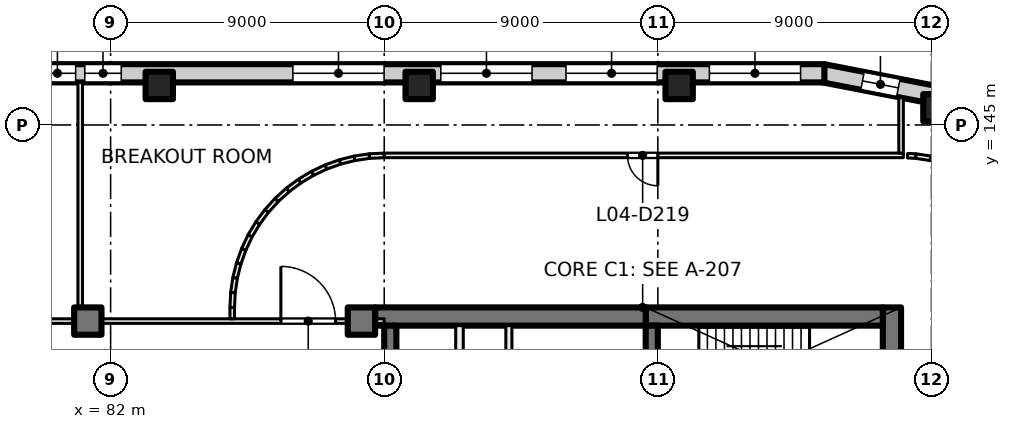
"""IFC4 building model, lengths in metres.
Left out: names, types, materials, properties, quantities, classifications, styles, units other than length and angle.
Written with IfcOpenShell. Run it as: python <this file> out.ifc"""

import sys

from ifc_helpers import new_model, si_unit, direction, frame, frame_2d, origin, origin_2d, place, context, subcontext, project, spatial, rectangle, extrude, element, fill, save


model = new_model("IFC4")
c1 = context("Model", 3, precision=1e-05, world=origin(), true_north=direction((0.0, 1.0)))
c2 = subcontext(c1, "Body", "Model", "MODEL_VIEW")
j1 = project(units=[si_unit("LENGTHUNIT", "METRE"), si_unit("PLANEANGLEUNIT", "RADIAN")], contexts=[c1])
p1 = place(None, origin())
s1 = spatial("IfcSite", under=j1, at=p1, CompositionType="ELEMENT")
p2 = place(p1, origin())
s2 = spatial("IfcBuilding", under=s1, at=p2, CompositionType="ELEMENT")
p3 = place(p2, frame((0.0, 0.0, 22.5)))
s3 = spatial("IfcBuildingStorey", under=s2, at=p3, CompositionType="ELEMENT", Elevation=22.5)
for number, where, z_axis, x_axis in (
    (1, (83.6, 146.3, 0.0), (0.0, 0.0, 1.0), (1.0, 0.0, 0.0)),
    (2, (92.15, 146.3, 0.0), (0.0, 0.0, 1.0), (1.0, 0.0, 0.0)),
    (3, (100.7, 146.3, 0.0), (0.0, 0.0, 1.0), (1.0, 0.0, 0.0)),
    (4, (109.18, 145.567, 0.0), (0.0, 0.0, 1.0), (1.0, 0.0, 0.0)),
    (5, (81.25, 138.55, 0.0), (0.0, 0.0, 1.0), (1.0, 0.0, 0.0)),
    (6, (90.25, 138.55, 0.0), (0.0, 0.0, 1.0), (1.0, 0.0, 0.0)),
):
    element("IfcColumn", number, at=place(p3, frame(where, z_axis=z_axis, x_axis=x_axis)), inside=s3, PredefinedType="COLUMN", context=c2, shape_type="SweptSolid", body=[
        extrude(rectangle(XDim=0.9, YDim=0.9, at=origin_2d()), origin(), (0.0, 0.0, 1.0), 5.0),
    ])
p4 = place(p3, frame((107.7, 139.0, 0.0), z_axis=(0.0, 0.0, 1.0), x_axis=(0.0, -1.0, 0.0)))
e7 = element("IfcWall", 7, at=p4, inside=s3, PredefinedType="SHEAR", context=c2, shape_type="SweptSolid", body=[
    extrude(rectangle(XDim=3.8, YDim=0.6, at=frame_2d((1.9, 0.0))), origin(), (0.0, 0.0, 1.0), 5.0),
])
p5 = place(p3, frame((107.4, 138.7, 0.0), z_axis=(0.0, 0.0, 1.0), x_axis=(-1.0, 0.0, 0.0)))
e8 = element("IfcWall", 8, at=p5, inside=s3, PredefinedType="SHEAR", context=c2, shape_type="SweptSolid", body=[
    extrude(rectangle(XDim=7.8, YDim=0.6, at=frame_2d((3.9, 0.0))), origin(), (0.0, 0.0, 1.0), 5.0),
])
p6 = place(p3, frame((99.6, 138.7, 0.0), z_axis=(0.0, 0.0, 1.0), x_axis=(-1.0, 0.0, 0.0)))
e9 = element("IfcWall", 9, at=p6, inside=s3, PredefinedType="SHEAR", context=c2, shape_type="SweptSolid", body=[
    extrude(rectangle(XDim=8.9, YDim=0.6, at=frame_2d((4.45, 0.0))), origin(), (0.0, 0.0, 1.0), 5.0),
])
p7 = place(p3, frame((99.8, 138.4, 0.0), z_axis=(0.0, 0.0, 1.0), x_axis=(0.0, -1.0, 0.0)))
e10 = element("IfcWall", 10, at=p7, inside=s3, PredefinedType="SHEAR", context=c2, shape_type="SweptSolid", body=[
    extrude(rectangle(XDim=2.8, YDim=0.4, at=frame_2d((1.4, 0.0))), origin(), (0.0, 0.0, 1.0), 5.0),
])
p8 = place(p7, frame((0.9, 0.0, 0.0)))
e11 = element("IfcOpeningElement", 11, at=p8, cuts=e10, PredefinedType="OPENING", context=c2, shape_type="SweptSolid", body=[
    extrude(rectangle(XDim=1.0, YDim=2.1, at=frame_2d((0.5, 1.05))), frame((0.0, 0.21, 0.0), z_axis=(0.0, -1.0, 0.0), x_axis=(1.0, 0.0, 0.0)), (0.0, 0.0, 1.0), 0.42),
])
p9 = place(p3, frame((91.2, 138.4, 0.0), z_axis=(0.0, 0.0, 1.0), x_axis=(0.0, -1.0, 0.0)))
e12 = element("IfcWall", 12, at=p9, inside=s3, PredefinedType="SHEAR", context=c2, shape_type="SweptSolid", body=[
    extrude(rectangle(XDim=8.6, YDim=0.4, at=frame_2d((4.3, 0.0))), origin(), (0.0, 0.0, 1.0), 5.0),
])
p10 = place(p3, frame((105.44, 146.702, 0.0), z_axis=(0.0, 0.0, 1.0), x_axis=(0.981593603981, -0.190981665674, 0.0)))
e13 = element("IfcWall", 13, at=p10, inside=s3, PredefinedType="SOLIDWALL", context=c2, shape_type="SweptSolid", body=[
    extrude(rectangle(XDim=4.025, YDim=0.6, at=frame_2d((2.013, 0.0))), origin(), (0.0, 0.0, 1.0), 4.625),
])
p11 = place(p10, frame((1.316, 0.0, 0.9)))
e14 = element("IfcOpeningElement", 14, at=p11, cuts=e13, PredefinedType="OPENING", context=c2, shape_type="SweptSolid", body=[
    extrude(rectangle(XDim=1.2, YDim=3.0, at=frame_2d((0.6, 1.5))), frame((0.0, 0.31, 0.0), z_axis=(0.0, -1.0, 0.0), x_axis=(1.0, 0.0, 0.0)), (0.0, 0.0, 1.0), 0.62),
])
p12 = place(p3, frame((46.114, 146.7, 0.0), z_axis=(0.0, 0.0, 1.0), x_axis=(1.0, 0.0, 0.0)))
e15 = element("IfcWall", 15, at=p12, inside=s3, PredefinedType="SOLIDWALL", context=c2, shape_type="SweptSolid", body=[
    extrude(rectangle(XDim=59.364, YDim=0.6, at=frame_2d((29.682, 0.0))), origin(), (0.0, 0.0, 1.0), 4.625),
])
p13 = place(p12, frame((5.35, 0.0, 0.9)))
e16 = element("IfcOpeningElement", 16, at=p13, cuts=e15, PredefinedType="OPENING", context=c2, shape_type="SweptSolid", body=[
    extrude(rectangle(XDim=3.0, YDim=3.0, at=frame_2d((1.5, 1.5))), frame((0.0, 0.31, 0.0), z_axis=(0.0, -1.0, 0.0), x_axis=(1.0, 0.0, 0.0)), (0.0, 0.0, 1.0), 0.62),
])
p14 = place(p12, frame((14.483, 0.0, 0.9)))
e17 = element("IfcOpeningElement", 17, at=p14, cuts=e15, PredefinedType="OPENING", context=c2, shape_type="SweptSolid", body=[
    extrude(rectangle(XDim=3.0, YDim=3.0, at=frame_2d((1.5, 1.5))), frame((0.0, 0.31, 0.0), z_axis=(0.0, -1.0, 0.0), x_axis=(1.0, 0.0, 0.0)), (0.0, 0.0, 1.0), 0.62),
])
p15 = place(p12, frame((23.615, 0.0, 0.9)))
e18 = element("IfcOpeningElement", 18, at=p15, cuts=e15, PredefinedType="OPENING", context=c2, shape_type="SweptSolid", body=[
    extrude(rectangle(XDim=3.0, YDim=3.0, at=frame_2d((1.5, 1.5))), frame((0.0, 0.31, 0.0), z_axis=(0.0, -1.0, 0.0), x_axis=(1.0, 0.0, 0.0)), (0.0, 0.0, 1.0), 0.62),
])
p16 = place(p12, frame((33.536, 0.0, 0.9)))
e19 = element("IfcOpeningElement", 19, at=p16, cuts=e15, PredefinedType="OPENING", context=c2, shape_type="SweptSolid", body=[
    extrude(rectangle(XDim=1.2, YDim=3.0, at=frame_2d((0.6, 1.5))), frame((0.0, 0.31, 0.0), z_axis=(0.0, -1.0, 0.0), x_axis=(1.0, 0.0, 0.0)), (0.0, 0.0, 1.0), 0.62),
])
p17 = place(p12, frame((35.036, 0.0, 0.9)))
e20 = element("IfcOpeningElement", 20, at=p17, cuts=e15, PredefinedType="OPENING", context=c2, shape_type="SweptSolid", body=[
    extrude(rectangle(XDim=1.2, YDim=3.0, at=frame_2d((0.6, 1.5))), frame((0.0, 0.31, 0.0), z_axis=(0.0, -1.0, 0.0), x_axis=(1.0, 0.0, 0.0)), (0.0, 0.0, 1.0), 0.62),
])
p18 = place(p12, frame((41.882, 0.0, 0.9)))
e21 = element("IfcOpeningElement", 21, at=p18, cuts=e15, PredefinedType="OPENING", context=c2, shape_type="SweptSolid", body=[
    extrude(rectangle(XDim=3.0, YDim=3.0, at=frame_2d((1.5, 1.5))), frame((0.0, 0.31, 0.0), z_axis=(0.0, -1.0, 0.0), x_axis=(1.0, 0.0, 0.0)), (0.0, 0.0, 1.0), 0.62),
])
p19 = place(p12, frame((46.748, 0.0, 0.9)))
e22 = element("IfcOpeningElement", 22, at=p19, cuts=e15, PredefinedType="OPENING", context=c2, shape_type="SweptSolid", body=[
    extrude(rectangle(XDim=3.0, YDim=3.0, at=frame_2d((1.5, 1.5))), frame((0.0, 0.31, 0.0), z_axis=(0.0, -1.0, 0.0), x_axis=(1.0, 0.0, 0.0)), (0.0, 0.0, 1.0), 0.62),
])
p20 = place(p12, frame((50.865, 0.0, 0.9)))
e23 = element("IfcOpeningElement", 23, at=p20, cuts=e15, PredefinedType="OPENING", context=c2, shape_type="SweptSolid", body=[
    extrude(rectangle(XDim=3.0, YDim=3.0, at=frame_2d((1.5, 1.5))), frame((0.0, 0.31, 0.0), z_axis=(0.0, -1.0, 0.0), x_axis=(1.0, 0.0, 0.0)), (0.0, 0.0, 1.0), 0.62),
])
p21 = place(p12, frame((55.581, 0.0, 0.9)))
e24 = element("IfcOpeningElement", 24, at=p21, cuts=e15, PredefinedType="OPENING", context=c2, shape_type="SweptSolid", body=[
    extrude(rectangle(XDim=3.0, YDim=3.0, at=frame_2d((1.5, 1.5))), frame((0.0, 0.31, 0.0), z_axis=(0.0, -1.0, 0.0), x_axis=(1.0, 0.0, 0.0)), (0.0, 0.0, 1.0), 0.62),
])
p22 = place(p3, frame((95.1, 130.0, 0.0), z_axis=(0.0, 0.0, 1.0), x_axis=(0.0, 1.0, 0.0)))
e25 = element("IfcWall", 25, at=p22, inside=s3, PredefinedType="PARTITIONING", context=c2, shape_type="SweptSolid", body=[
    extrude(rectangle(XDim=8.4, YDim=0.2, at=frame_2d((4.2, 0.0))), origin(), (0.0, 0.0, 1.0), 4.625),
])
p23 = place(p22, frame((5.25, 0.0, 0.0)))
e26 = element("IfcOpeningElement", 26, at=p23, cuts=e25, PredefinedType="OPENING", context=c2, shape_type="SweptSolid", body=[
    extrude(rectangle(XDim=1.5, YDim=2.1, at=frame_2d((0.75, 1.05))), frame((0.0, 0.11, 0.0), z_axis=(0.0, -1.0, 0.0), x_axis=(1.0, 0.0, 0.0)), (0.0, 0.0, 1.0), 0.22),
])
p24 = place(p3, frame((93.475, 130.0, 0.0), z_axis=(0.0, 0.0, 1.0), x_axis=(0.0, 1.0, 0.0)))
e27 = element("IfcWall", 27, at=p24, inside=s3, PredefinedType="PARTITIONING", context=c2, shape_type="SweptSolid", body=[
    extrude(rectangle(XDim=8.4, YDim=0.25, at=frame_2d((4.2, 0.0))), origin(), (0.0, 0.0, 1.0), 4.625),
])
p25 = place(p24, frame((3.7, 0.0, 0.0)))
e28 = element("IfcOpeningElement", 28, at=p25, cuts=e27, PredefinedType="OPENING", context=c2, shape_type="SweptSolid", body=[
    extrude(rectangle(XDim=1.0, YDim=2.1, at=frame_2d((0.5, 1.05))), frame((0.0, 0.135, 0.0), z_axis=(0.0, -1.0, 0.0), x_axis=(1.0, 0.0, 0.0)), (0.0, 0.0, 1.0), 0.27),
])
p26 = place(p3, frame((49.825, 138.55, 0.0), z_axis=(0.0, 0.0, 1.0), x_axis=(1.0, 0.0, 0.0)))
e29 = element("IfcWall", 29, at=p26, inside=s3, PredefinedType="PARTITIONING", context=c2, shape_type="SweptSolid", body=[
    extrude(rectangle(XDim=41.175, YDim=0.15, at=frame_2d((20.587, 0.0))), origin(), (0.0, 0.0, 1.0), 4.625),
])
p27 = place(p26, frame((37.775, 0.0, 0.0)))
e30 = element("IfcOpeningElement", 30, at=p27, cuts=e29, PredefinedType="OPENING", context=c2, shape_type="SweptSolid", body=[
    extrude(rectangle(XDim=1.8, YDim=2.1, at=frame_2d((0.9, 1.05))), frame((0.0, 0.085, 0.0), z_axis=(0.0, -1.0, 0.0), x_axis=(1.0, 0.0, 0.0)), (0.0, 0.0, 1.0), 0.17),
])
p28 = place(p3, frame((81.0, 138.625, 0.0), z_axis=(0.0, 0.0, 1.0), x_axis=(0.0, 1.0, 0.0)))
e31 = element("IfcWall", 31, at=p28, inside=s3, PredefinedType="PARTITIONING", context=c2, shape_type="SweptSolid", body=[
    extrude(rectangle(XDim=7.775, YDim=0.15, at=frame_2d((3.887, 0.0))), origin(), (0.0, 0.0, 1.0), 4.625),
])
p29 = place(p3, frame((86.0, 138.625, 0.0), z_axis=(0.0, 0.0, 1.0), x_axis=(0.0, 1.0, 0.0)))
e32 = element("IfcWall", 32, at=p29, inside=s3, PredefinedType="PARTITIONING", context=c2, shape_type="SweptSolid", body=[
    extrude(rectangle(XDim=0.377, YDim=0.15, at=frame_2d((0.188, 0.0))), origin(), (0.0, 0.0, 1.0), 4.625),
])
p30 = place(p3, frame((86.0, 138.998, 0.0), z_axis=(0.0, 0.0, 1.0), x_axis=(0.048196018647, 0.998837896651, 0.0)))
e33 = element("IfcWall", 33, at=p30, inside=s3, PredefinedType="PARTITIONING", context=c2, shape_type="SweptSolid", body=[
    extrude(rectangle(XDim=0.496, YDim=0.15, at=frame_2d((0.248, 0.0))), origin(), (0.0, 0.0, 1.0), 4.625),
])
p31 = place(p3, frame((86.023, 139.486, 0.0), z_axis=(0.0, 0.0, 1.0), x_axis=(0.148412307247, 0.988925572052, 0.0)))
e34 = element("IfcWall", 34, at=p31, inside=s3, PredefinedType="PARTITIONING", context=c2, shape_type="SweptSolid", body=[
    extrude(rectangle(XDim=0.499, YDim=0.15, at=frame_2d((0.249, 0.0))), origin(), (0.0, 0.0, 1.0), 4.625),
])
p32 = place(p3, frame((86.095, 139.971, 0.0), z_axis=(0.0, 0.0, 1.0), x_axis=(0.242650732785, 0.970113715952, 0.0)))
e35 = element("IfcWall", 35, at=p32, inside=s3, PredefinedType="PARTITIONING", context=c2, shape_type="SweptSolid", body=[
    extrude(rectangle(XDim=0.499, YDim=0.15, at=frame_2d((0.25, 0.0))), origin(), (0.0, 0.0, 1.0), 4.625),
])
for number, where, z_axis, x_axis in (
    (36, (86.214, 140.447, 0.0), (0.0, 0.0, 1.0), (0.337, 0.941, 0.0)),
    (37, (86.379, 140.91, 0.0), (0.0, 0.0, 1.0), (0.428, 0.904, 0.0)),
):
    element("IfcWall", number, at=place(p3, frame(where, z_axis=z_axis, x_axis=x_axis)), inside=s3, PredefinedType="PARTITIONING", context=c2, shape_type="SweptSolid", body=[
        extrude(rectangle(XDim=0.498, YDim=0.15, at=frame_2d((0.249, 0.0))), origin(), (0.0, 0.0, 1.0), 4.625),
    ])
p33 = place(p3, frame((86.588, 141.354, 0.0), z_axis=(0.0, 0.0, 1.0), x_axis=(0.515791778052, 0.85671397893, 0.0)))
e38 = element("IfcWall", 38, at=p33, inside=s3, PredefinedType="PARTITIONING", context=c2, shape_type="SweptSolid", body=[
    extrude(rectangle(XDim=0.499, YDim=0.15, at=frame_2d((0.249, 0.0))), origin(), (0.0, 0.0, 1.0), 4.625),
])
p34 = place(p3, frame((86.841, 141.775, 0.0), z_axis=(0.0, 0.0, 1.0), x_axis=(0.594570362092, 0.80404358372, 0.0)))
e39 = element("IfcWall", 39, at=p34, inside=s3, PredefinedType="PARTITIONING", context=c2, shape_type="SweptSolid", body=[
    extrude(rectangle(XDim=0.498, YDim=0.15, at=frame_2d((0.249, 0.0))), origin(), (0.0, 0.0, 1.0), 4.625),
])
for number, where, z_axis, x_axis in (
    (40, (87.133, 142.169, 0.0), (0.0, 0.0, 1.0), (0.67, 0.742, 0.0)),
    (41, (87.461, 142.533, 0.0), (0.0, 0.0, 1.0), (0.742, 0.67, 0.0)),
):
    element("IfcWall", number, at=place(p3, frame(where, z_axis=z_axis, x_axis=x_axis)), inside=s3, PredefinedType="PARTITIONING", context=c2, shape_type="SweptSolid", body=[
        extrude(rectangle(XDim=0.499, YDim=0.15, at=frame_2d((0.249, 0.0))), origin(), (0.0, 0.0, 1.0), 4.625),
    ])
p35 = place(p3, frame((87.825, 142.863, 0.0), z_axis=(0.0, 0.0, 1.0), x_axis=(0.80404358372, 0.594570362092, 0.0)))
e42 = element("IfcWall", 42, at=p35, inside=s3, PredefinedType="PARTITIONING", context=c2, shape_type="SweptSolid", body=[
    extrude(rectangle(XDim=0.498, YDim=0.15, at=frame_2d((0.249, 0.0))), origin(), (0.0, 0.0, 1.0), 4.625),
])
p36 = place(p3, frame((88.219, 143.155, 0.0), z_axis=(0.0, 0.0, 1.0), x_axis=(0.85671397893, 0.515791778052, 0.0)))
e43 = element("IfcWall", 43, at=p36, inside=s3, PredefinedType="PARTITIONING", context=c2, shape_type="SweptSolid", body=[
    extrude(rectangle(XDim=0.499, YDim=0.15, at=frame_2d((0.249, 0.0))), origin(), (0.0, 0.0, 1.0), 4.625),
])
for number, where, z_axis, x_axis in (
    (44, (88.64, 143.408, 0.0), (0.0, 0.0, 1.0), (0.904, 0.428, 0.0)),
    (45, (89.084, 143.618, 0.0), (0.0, 0.0, 1.0), (0.941, 0.337, 0.0)),
):
    element("IfcWall", number, at=place(p3, frame(where, z_axis=z_axis, x_axis=x_axis)), inside=s3, PredefinedType="PARTITIONING", context=c2, shape_type="SweptSolid", body=[
        extrude(rectangle(XDim=0.498, YDim=0.15, at=frame_2d((0.249, 0.0))), origin(), (0.0, 0.0, 1.0), 4.625),
    ])
p37 = place(p3, frame((89.545, 143.784, 0.0), z_axis=(0.0, 0.0, 1.0), x_axis=(0.970113715952, 0.242650732785, 0.0)))
e46 = element("IfcWall", 46, at=p37, inside=s3, PredefinedType="PARTITIONING", context=c2, shape_type="SweptSolid", body=[
    extrude(rectangle(XDim=0.499, YDim=0.15, at=frame_2d((0.25, 0.0))), origin(), (0.0, 0.0, 1.0), 4.625),
])
p38 = place(p3, frame((90.021, 143.903, 0.0), z_axis=(0.0, 0.0, 1.0), x_axis=(0.988925572052, 0.148412307247, 0.0)))
e47 = element("IfcWall", 47, at=p38, inside=s3, PredefinedType="PARTITIONING", context=c2, shape_type="SweptSolid", body=[
    extrude(rectangle(XDim=0.499, YDim=0.15, at=frame_2d((0.249, 0.0))), origin(), (0.0, 0.0, 1.0), 4.625),
])
p39 = place(p3, frame((90.506, 143.976, 0.0), z_axis=(0.0, 0.0, 1.0), x_axis=(0.998837896651, 0.048196018647, 0.0)))
e48 = element("IfcWall", 48, at=p39, inside=s3, PredefinedType="PARTITIONING", context=c2, shape_type="SweptSolid", body=[
    extrude(rectangle(XDim=0.496, YDim=0.15, at=frame_2d((0.248, 0.0))), origin(), (0.0, 0.0, 1.0), 4.625),
])
p40 = place(p3, frame((90.998, 144.0, 0.0), z_axis=(0.0, 0.0, 1.0), x_axis=(1.0, 0.0, 0.0)))
e49 = element("IfcWall", 49, at=p40, inside=s3, PredefinedType="PARTITIONING", context=c2, shape_type="SweptSolid", body=[
    extrude(rectangle(XDim=17.077, YDim=0.15, at=frame_2d((8.539, 0.0))), origin(), (0.0, 0.0, 1.0), 4.625),
])
p41 = place(p40, frame((8.002, 0.0, 0.0)))
e50 = element("IfcOpeningElement", 50, at=p41, cuts=e49, PredefinedType="OPENING", context=c2, shape_type="SweptSolid", body=[
    extrude(rectangle(XDim=1.0, YDim=2.1, at=frame_2d((0.5, 1.05))), frame((0.0, 0.085, 0.0), z_axis=(0.0, -1.0, 0.0), x_axis=(1.0, 0.0, 0.0)), (0.0, 0.0, 1.0), 0.17),
])
p42 = place(p3, frame((108.0, 144.075, 0.0), z_axis=(0.0, 0.0, 1.0), x_axis=(0.0, 1.0, 0.0)))
e51 = element("IfcWall", 51, at=p42, inside=s3, PredefinedType="PARTITIONING", context=c2, shape_type="SweptSolid", body=[
    extrude(rectangle(XDim=1.823, YDim=0.15, at=frame_2d((0.912, 0.0))), origin(), (0.0, 0.0, 1.0), 4.625),
])
p43 = place(p3, frame((108.214, 143.99, 0.0), z_axis=(0.0, 0.0, 1.0), x_axis=(0.99876534507, -0.049676810357, 0.0)))
e52 = element("IfcWall", 52, at=p43, inside=s3, PredefinedType="PARTITIONING", context=c2, shape_type="SweptSolid", body=[
    extrude(rectangle(XDim=0.28, YDim=0.15, at=frame_2d((0.14, 0.0))), origin(), (0.0, 0.0, 1.0), 4.625),
])
p44 = place(p3, frame((108.486, 143.977, 0.0), z_axis=(0.0, 0.0, 1.0), x_axis=(0.988925572052, -0.148412307247, 0.0)))
e53 = element("IfcWall", 53, at=p44, inside=s3, PredefinedType="PARTITIONING", context=c2, shape_type="SweptSolid", body=[
    extrude(rectangle(XDim=0.499, YDim=0.15, at=frame_2d((0.249, 0.0))), origin(), (0.0, 0.0, 1.0), 4.625),
])
p45 = place(p3, frame((108.971, 143.905, 0.0), z_axis=(0.0, 0.0, 1.0), x_axis=(0.970113715952, -0.242650732785, 0.0)))
e54 = element("IfcWall", 54, at=p45, inside=s3, PredefinedType="PARTITIONING", context=c2, shape_type="SweptSolid", body=[
    extrude(rectangle(XDim=0.499, YDim=0.15, at=frame_2d((0.25, 0.0))), origin(), (0.0, 0.0, 1.0), 4.625),
])
p46 = place(p11, origin())
e55 = element("IfcWindow", 55, at=p46, inside=s3, PartitioningType="SINGLE_PANEL", PredefinedType="WINDOW", context=c2, shape_type="SweptSolid", body=[
    extrude(rectangle(XDim=1.2, YDim=3.0, at=frame_2d((0.6, 1.5))), frame((0.0, 0.03, 0.0), z_axis=(0.0, -1.0, 0.0), x_axis=(1.0, 0.0, 0.0)), (0.0, 0.0, 1.0), 0.06),
])
fill(e14, e55)
p47 = place(p16, origin())
e56 = element("IfcWindow", 56, at=p47, inside=s3, PartitioningType="SINGLE_PANEL", PredefinedType="WINDOW", context=c2, shape_type="SweptSolid", body=[
    extrude(rectangle(XDim=1.2, YDim=3.0, at=frame_2d((0.6, 1.5))), frame((0.0, 0.03, 0.0), z_axis=(0.0, -1.0, 0.0), x_axis=(1.0, 0.0, 0.0)), (0.0, 0.0, 1.0), 0.06),
])
fill(e19, e56)
p48 = place(p17, origin())
e57 = element("IfcWindow", 57, at=p48, inside=s3, PartitioningType="SINGLE_PANEL", PredefinedType="WINDOW", context=c2, shape_type="SweptSolid", body=[
    extrude(rectangle(XDim=1.2, YDim=3.0, at=frame_2d((0.6, 1.5))), frame((0.0, 0.03, 0.0), z_axis=(0.0, -1.0, 0.0), x_axis=(1.0, 0.0, 0.0)), (0.0, 0.0, 1.0), 0.06),
])
fill(e20, e57)
p49 = place(p18, origin())
e58 = element("IfcWindow", 58, at=p49, inside=s3, PartitioningType="SINGLE_PANEL", PredefinedType="WINDOW", context=c2, shape_type="SweptSolid", body=[
    extrude(rectangle(XDim=3.0, YDim=3.0, at=frame_2d((1.5, 1.5))), frame((0.0, 0.03, 0.0), z_axis=(0.0, -1.0, 0.0), x_axis=(1.0, 0.0, 0.0)), (0.0, 0.0, 1.0), 0.06),
])
fill(e21, e58)
p50 = place(p19, origin())
e59 = element("IfcWindow", 59, at=p50, inside=s3, PartitioningType="SINGLE_PANEL", PredefinedType="WINDOW", context=c2, shape_type="SweptSolid", body=[
    extrude(rectangle(XDim=3.0, YDim=3.0, at=frame_2d((1.5, 1.5))), frame((0.0, 0.03, 0.0), z_axis=(0.0, -1.0, 0.0), x_axis=(1.0, 0.0, 0.0)), (0.0, 0.0, 1.0), 0.06),
])
fill(e22, e59)
p51 = place(p20, origin())
e60 = element("IfcWindow", 60, at=p51, inside=s3, PartitioningType="SINGLE_PANEL", PredefinedType="WINDOW", context=c2, shape_type="SweptSolid", body=[
    extrude(rectangle(XDim=3.0, YDim=3.0, at=frame_2d((1.5, 1.5))), frame((0.0, 0.03, 0.0), z_axis=(0.0, -1.0, 0.0), x_axis=(1.0, 0.0, 0.0)), (0.0, 0.0, 1.0), 0.06),
])
fill(e23, e60)
p52 = place(p21, origin())
e61 = element("IfcWindow", 61, at=p52, inside=s3, PartitioningType="SINGLE_PANEL", PredefinedType="WINDOW", context=c2, shape_type="SweptSolid", body=[
    extrude(rectangle(XDim=3.0, YDim=3.0, at=frame_2d((1.5, 1.5))), frame((0.0, 0.03, 0.0), z_axis=(0.0, -1.0, 0.0), x_axis=(1.0, 0.0, 0.0)), (0.0, 0.0, 1.0), 0.06),
])
fill(e24, e61)
p53 = place(p27, origin())
e62 = element("IfcDoor", 62, at=p53, inside=s3, OperationType="DOUBLE_DOOR_SINGLE_SWING", PredefinedType="DOOR", context=c2, shape_type="SweptSolid", body=[
    extrude(rectangle(XDim=1.8, YDim=2.1, at=frame_2d((0.9, 1.05))), frame((0.0, 0.025, 0.0), z_axis=(0.0, -1.0, 0.0), x_axis=(1.0, 0.0, 0.0)), (0.0, 0.0, 1.0), 0.05),
])
fill(e30, e62)
p54 = place(p41, origin())
e63 = element("IfcDoor", 63, at=p54, inside=s3, OperationType="SINGLE_SWING_RIGHT", PredefinedType="DOOR", context=c2, shape_type="SweptSolid", body=[
    extrude(rectangle(XDim=1.0, YDim=2.1, at=frame_2d((0.5, 1.05))), frame((0.0, 0.025, 0.0), z_axis=(0.0, -1.0, 0.0), x_axis=(1.0, 0.0, 0.0)), (0.0, 0.0, 1.0), 0.05),
])
fill(e50, e63)
save(model, sys.argv[1])
